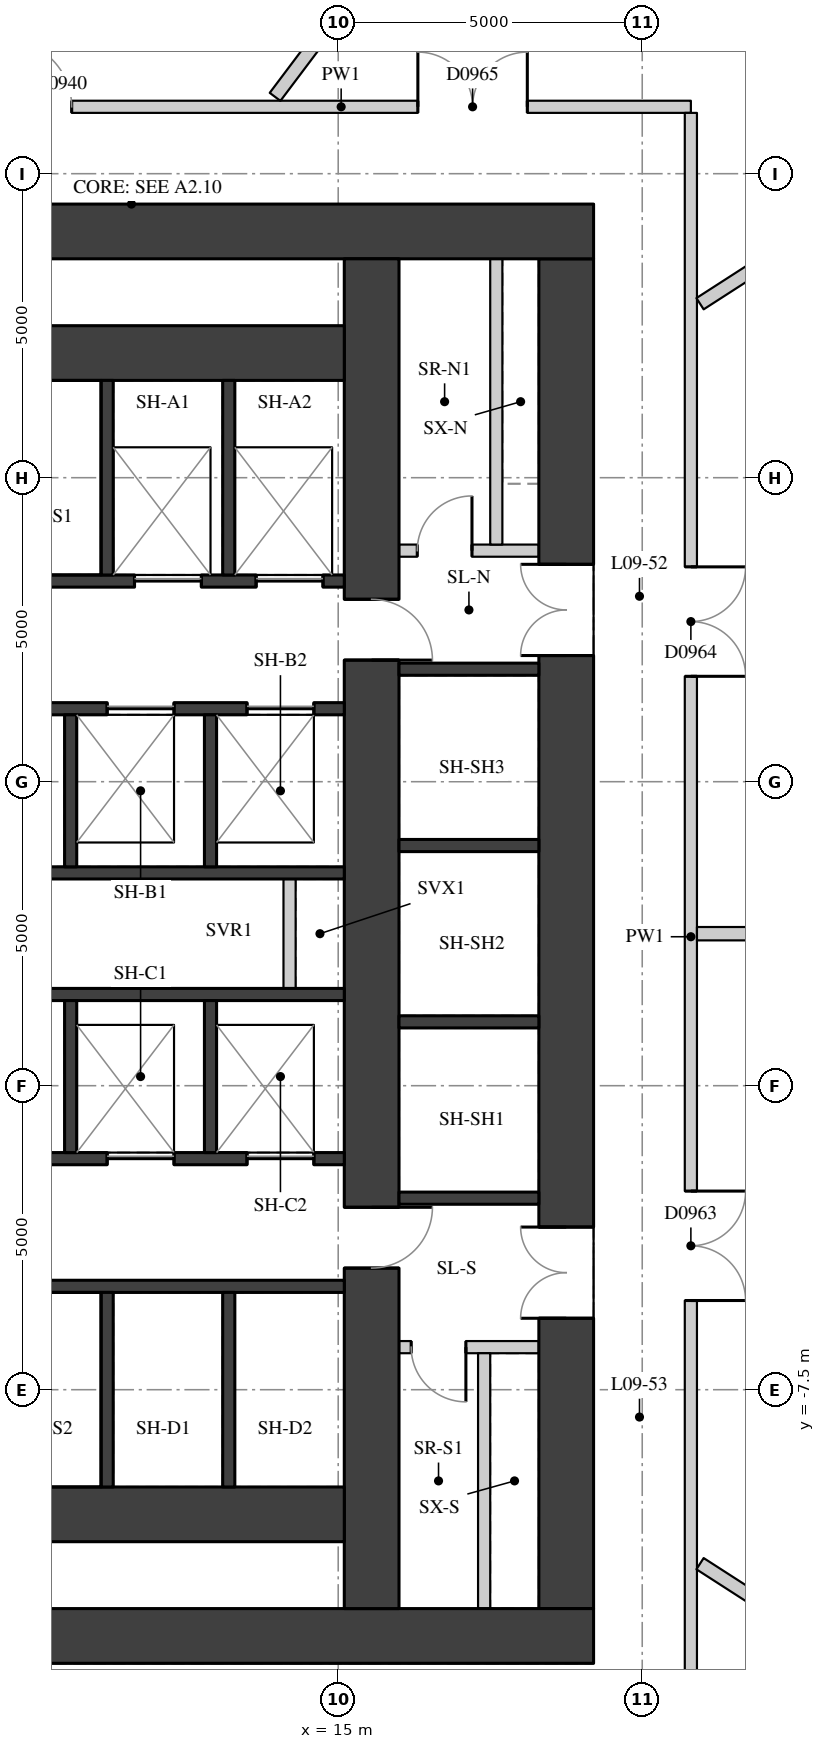
"""IFC4 building model, lengths in metres.
Left out: names, types, materials, properties, quantities, classifications, styles, units other than length and angle.
Written with IfcOpenShell. Run it as: python <this file> out.ifc"""

import sys

from ifc_helpers import new_model, si_unit, direction, frame, frame_2d, origin, place, context, subcontext, project, spatial, rectangle, extrude, element, fill, save


model = new_model("IFC4")
c1 = context("Model", 3, precision=1e-05, world=origin(), true_north=direction((0.0, 1.0)))
c2 = subcontext(c1, "Body", "Model", "MODEL_VIEW")
j1 = project(units=[si_unit("LENGTHUNIT", "METRE"), si_unit("PLANEANGLEUNIT", "RADIAN")], contexts=[c1])
p1 = place(None, origin())
s1 = spatial("IfcSite", under=j1, at=p1, CompositionType="ELEMENT")
p2 = place(p1, origin())
s2 = spatial("IfcBuilding", under=s1, at=p2, CompositionType="ELEMENT")
p3 = place(p2, frame((0.0, 0.0, 38.2)))
s3 = spatial("IfcBuildingStorey", under=s2, at=p3, CompositionType="ELEMENT", Elevation=38.2)
p4 = place(p3, frame((18.75, -11.1, 0.0), z_axis=(0.0, 0.0, 1.0), x_axis=(0.0, 1.0, 0.0)))
e1 = element("IfcWall", 1, at=p4, inside=s3, PredefinedType="SHEAR", context=c2, shape_type="SweptSolid", body=[
    extrude(rectangle(XDim=22.2, YDim=0.9, at=frame_2d((11.1, 0.0))), origin(), (0.0, 0.0, 1.0), 3.02),
])
p5 = place(p4, frame((15.675, 0.0, 0.0)))
e2 = element("IfcOpeningElement", 2, at=p5, cuts=e1, PredefinedType="OPENING", context=c2, shape_type="SweptSolid", body=[
    extrude(rectangle(XDim=1.5, YDim=2.1, at=frame_2d((0.75, 1.05))), frame((0.0, 0.46, 0.0), z_axis=(0.0, -1.0, 0.0), x_axis=(1.0, 0.0, 0.0)), (0.0, 0.0, 1.0), 0.92),
])
p6 = place(p4, frame((4.775, 0.0, 0.0)))
e3 = element("IfcOpeningElement", 3, at=p6, cuts=e1, PredefinedType="OPENING", context=c2, shape_type="SweptSolid", body=[
    extrude(rectangle(XDim=1.5, YDim=2.1, at=frame_2d((0.75, 1.05))), frame((0.0, 0.46, 0.0), z_axis=(0.0, -1.0, 0.0), x_axis=(1.0, 0.0, 0.0)), (0.0, 0.0, 1.0), 0.92),
])
for number, where, z_axis, x_axis in (
    (4, (4.0, 11.55, 0.0), (0.0, 0.0, 1.0), (1.0, 0.0, 0.0)),
    (5, (4.0, -11.55, 0.0), (0.0, 0.0, 1.0), (1.0, 0.0, 0.0)),
):
    element("IfcWall", number, at=place(p3, frame(where, z_axis=z_axis, x_axis=x_axis)), inside=s3, PredefinedType="SHEAR", context=c2, shape_type="SweptSolid", body=[
        extrude(rectangle(XDim=15.2, YDim=0.9, at=frame_2d((7.6, 0.0))), origin(), (0.0, 0.0, 1.0), 3.02),
    ])
p7 = place(p3, frame((15.55, -11.1, 0.0), z_axis=(0.0, 0.0, 1.0), x_axis=(0.0, 1.0, 0.0)))
e6 = element("IfcWall", 6, at=p7, inside=s3, PredefinedType="SHEAR", context=c2, shape_type="SweptSolid", body=[
    extrude(rectangle(XDim=22.2, YDim=0.9, at=frame_2d((11.1, 0.0))), origin(), (0.0, 0.0, 1.0), 3.02),
])
p8 = place(p7, frame((15.6, 0.0, 0.0)))
e7 = element("IfcOpeningElement", 7, at=p8, cuts=e6, PredefinedType="OPENING", context=c2, shape_type="SweptSolid", body=[
    extrude(rectangle(XDim=1.0, YDim=2.1, at=frame_2d((0.5, 1.05))), frame((0.0, 0.46, 0.0), z_axis=(0.0, -1.0, 0.0), x_axis=(1.0, 0.0, 0.0)), (0.0, 0.0, 1.0), 0.92),
])
p9 = place(p7, frame((5.6, 0.0, 0.0)))
e8 = element("IfcOpeningElement", 8, at=p9, cuts=e6, PredefinedType="OPENING", context=c2, shape_type="SweptSolid", body=[
    extrude(rectangle(XDim=1.0, YDim=2.1, at=frame_2d((0.5, 1.05))), frame((0.0, 0.46, 0.0), z_axis=(0.0, -1.0, 0.0), x_axis=(1.0, 0.0, 0.0)), (0.0, 0.0, 1.0), 0.92),
])
for number, where, z_axis, x_axis in (
    (9, (4.9, 9.55, 0.0), (0.0, 0.0, 1.0), (1.0, 0.0, 0.0)),
    (10, (4.9, -9.55, 0.0), (0.0, 0.0, 1.0), (1.0, 0.0, 0.0)),
):
    element("IfcWall", number, at=place(p3, frame(where, z_axis=z_axis, x_axis=x_axis)), inside=s3, PredefinedType="SHEAR", context=c2, shape_type="SweptSolid", body=[
        extrude(rectangle(XDim=10.2, YDim=0.9, at=frame_2d((5.1, 0.0))), origin(), (0.0, 0.0, 1.0), 3.02),
    ])
p10 = place(p3, frame((4.9, 5.8, 0.0), z_axis=(0.0, 0.0, 1.0), x_axis=(1.0, 0.0, 0.0)))
e11 = element("IfcWall", 11, at=p10, inside=s3, PredefinedType="SHEAR", context=c2, shape_type="SweptSolid", body=[
    extrude(rectangle(XDim=10.2, YDim=0.2, at=frame_2d((5.1, 0.0))), origin(), (0.0, 0.0, 1.0), 3.02),
])
p11 = place(p10, frame((6.75, 0.0, 0.0)))
e12 = element("IfcOpeningElement", 12, at=p11, cuts=e11, PredefinedType="OPENING", context=c2, shape_type="SweptSolid", body=[
    extrude(rectangle(XDim=1.1, YDim=2.1, at=frame_2d((0.55, 1.05))), frame((0.0, 0.11, 0.0), z_axis=(0.0, -1.0, 0.0), x_axis=(1.0, 0.0, 0.0)), (0.0, 0.0, 1.0), 0.22),
])
p12 = place(p10, frame((8.75, 0.0, 0.0)))
e13 = element("IfcOpeningElement", 13, at=p12, cuts=e11, PredefinedType="OPENING", context=c2, shape_type="SweptSolid", body=[
    extrude(rectangle(XDim=1.1, YDim=2.1, at=frame_2d((0.55, 1.05))), frame((0.0, 0.11, 0.0), z_axis=(0.0, -1.0, 0.0), x_axis=(1.0, 0.0, 0.0)), (0.0, 0.0, 1.0), 0.22),
])
p13 = place(p3, frame((4.9, 3.7, 0.0), z_axis=(0.0, 0.0, 1.0), x_axis=(1.0, 0.0, 0.0)))
e14 = element("IfcWall", 14, at=p13, inside=s3, PredefinedType="SHEAR", context=c2, shape_type="SweptSolid", body=[
    extrude(rectangle(XDim=10.2, YDim=0.2, at=frame_2d((5.1, 0.0))), origin(), (0.0, 0.0, 1.0), 3.02),
])
p14 = place(p13, frame((6.3, 0.0, 0.0)))
e15 = element("IfcOpeningElement", 15, at=p14, cuts=e14, PredefinedType="OPENING", context=c2, shape_type="SweptSolid", body=[
    extrude(rectangle(XDim=1.1, YDim=2.1, at=frame_2d((0.55, 1.05))), frame((0.0, 0.11, 0.0), z_axis=(0.0, -1.0, 0.0), x_axis=(1.0, 0.0, 0.0)), (0.0, 0.0, 1.0), 0.22),
])
p15 = place(p13, frame((8.6, 0.0, 0.0)))
e16 = element("IfcOpeningElement", 16, at=p15, cuts=e14, PredefinedType="OPENING", context=c2, shape_type="SweptSolid", body=[
    extrude(rectangle(XDim=1.1, YDim=2.1, at=frame_2d((0.55, 1.05))), frame((0.0, 0.11, 0.0), z_axis=(0.0, -1.0, 0.0), x_axis=(1.0, 0.0, 0.0)), (0.0, 0.0, 1.0), 0.22),
])
for number, where, z_axis, x_axis in (
    (17, (4.9, 1.0, 0.0), (0.0, 0.0, 1.0), (1.0, 0.0, 0.0)),
    (18, (4.9, -1.0, 0.0), (0.0, 0.0, 1.0), (1.0, 0.0, 0.0)),
):
    element("IfcWall", number, at=place(p3, frame(where, z_axis=z_axis, x_axis=x_axis)), inside=s3, PredefinedType="SHEAR", context=c2, shape_type="SweptSolid", body=[
        extrude(rectangle(XDim=10.2, YDim=0.2, at=frame_2d((5.1, 0.0))), origin(), (0.0, 0.0, 1.0), 3.02),
    ])
p16 = place(p3, frame((4.9, -3.7, 0.0), z_axis=(0.0, 0.0, 1.0), x_axis=(1.0, 0.0, 0.0)))
e19 = element("IfcWall", 19, at=p16, inside=s3, PredefinedType="SHEAR", context=c2, shape_type="SweptSolid", body=[
    extrude(rectangle(XDim=10.2, YDim=0.2, at=frame_2d((5.1, 0.0))), origin(), (0.0, 0.0, 1.0), 3.02),
])
p17 = place(p16, frame((6.3, 0.0, 0.0)))
e20 = element("IfcOpeningElement", 20, at=p17, cuts=e19, PredefinedType="OPENING", context=c2, shape_type="SweptSolid", body=[
    extrude(rectangle(XDim=1.1, YDim=2.1, at=frame_2d((0.55, 1.05))), frame((0.0, 0.11, 0.0), z_axis=(0.0, -1.0, 0.0), x_axis=(1.0, 0.0, 0.0)), (0.0, 0.0, 1.0), 0.22),
])
p18 = place(p16, frame((8.6, 0.0, 0.0)))
e21 = element("IfcOpeningElement", 21, at=p18, cuts=e19, PredefinedType="OPENING", context=c2, shape_type="SweptSolid", body=[
    extrude(rectangle(XDim=1.1, YDim=2.1, at=frame_2d((0.55, 1.05))), frame((0.0, 0.11, 0.0), z_axis=(0.0, -1.0, 0.0), x_axis=(1.0, 0.0, 0.0)), (0.0, 0.0, 1.0), 0.22),
])
p19 = place(p3, frame((4.9, -5.8, 0.0), z_axis=(0.0, 0.0, 1.0), x_axis=(1.0, 0.0, 0.0)))
e22 = element("IfcWall", 22, at=p19, inside=s3, PredefinedType="SHEAR", context=c2, shape_type="SweptSolid", body=[
    extrude(rectangle(XDim=10.2, YDim=0.2, at=frame_2d((5.1, 0.0))), origin(), (0.0, 0.0, 1.0), 3.02),
])
for number, where, z_axis, x_axis in (
    (23, (11.2, 5.9, 0.0), (0.0, 0.0, 1.0), (0.0, 1.0, 0.0)),
    (24, (11.2, -9.1, 0.0), (0.0, 0.0, 1.0), (0.0, 1.0, 0.0)),
    (25, (13.2, 5.9, 0.0), (0.0, 0.0, 1.0), (0.0, 1.0, 0.0)),
    (26, (13.2, -9.1, 0.0), (0.0, 0.0, 1.0), (0.0, 1.0, 0.0)),
):
    element("IfcWall", number, at=place(p3, frame(where, z_axis=z_axis, x_axis=x_axis)), inside=s3, PredefinedType="SHEAR", context=c2, shape_type="SweptSolid", body=[
        extrude(rectangle(XDim=3.2, YDim=0.2, at=frame_2d((1.6, 0.0))), origin(), (0.0, 0.0, 1.0), 3.02),
    ])
for number, where, z_axis, x_axis in (
    (27, (10.6, 1.1, 0.0), (0.0, 0.0, 1.0), (0.0, 1.0, 0.0)),
    (28, (10.6, -3.6, 0.0), (0.0, 0.0, 1.0), (0.0, 1.0, 0.0)),
    (29, (12.9, 1.1, 0.0), (0.0, 0.0, 1.0), (0.0, 1.0, 0.0)),
    (30, (12.9, -3.6, 0.0), (0.0, 0.0, 1.0), (0.0, 1.0, 0.0)),
):
    element("IfcWall", number, at=place(p3, frame(where, z_axis=z_axis, x_axis=x_axis)), inside=s3, PredefinedType="SHEAR", context=c2, shape_type="SweptSolid", body=[
        extrude(rectangle(XDim=2.5, YDim=0.2, at=frame_2d((1.25, 0.0))), origin(), (0.0, 0.0, 1.0), 3.02),
    ])
p20 = place(p3, frame((14.2, -0.9, 0.0), z_axis=(0.0, 0.0, 1.0), x_axis=(0.0, 1.0, 0.0)))
e31 = element("IfcWall", 31, at=p20, inside=s3, PredefinedType="PARTITIONING", context=c2, shape_type="SweptSolid", body=[
    extrude(rectangle(XDim=1.8, YDim=0.2, at=frame_2d((0.9, 0.0))), origin(), (0.0, 0.0, 1.0), 3.02),
])
for number, where, z_axis, x_axis in (
    (32, (16.0, -4.35, 0.0), (0.0, 0.0, 1.0), (1.0, 0.0, 0.0)),
    (33, (16.0, -1.45, 0.0), (0.0, 0.0, 1.0), (1.0, 0.0, 0.0)),
    (34, (16.0, 1.45, 0.0), (0.0, 0.0, 1.0), (1.0, 0.0, 0.0)),
    (35, (16.0, 4.35, 0.0), (0.0, 0.0, 1.0), (1.0, 0.0, 0.0)),
):
    element("IfcWall", number, at=place(p3, frame(where, z_axis=z_axis, x_axis=x_axis)), inside=s3, PredefinedType="SHEAR", context=c2, shape_type="SweptSolid", body=[
        extrude(rectangle(XDim=2.3, YDim=0.2, at=frame_2d((1.15, 0.0))), origin(), (0.0, 0.0, 1.0), 3.02),
    ])
p21 = place(p3, frame((16.0, 6.3, 0.0), z_axis=(0.0, 0.0, 1.0), x_axis=(1.0, 0.0, 0.0)))
e36 = element("IfcWall", 36, at=p21, inside=s3, PredefinedType="PARTITIONING", context=c2, shape_type="SweptSolid", body=[
    extrude(rectangle(XDim=2.3, YDim=0.2, at=frame_2d((1.15, 0.0))), origin(), (0.0, 0.0, 1.0), 3.02),
])
p22 = place(p21, frame((0.3, 0.0, 0.0)))
e37 = element("IfcOpeningElement", 37, at=p22, cuts=e36, PredefinedType="OPENING", context=c2, shape_type="SweptSolid", body=[
    extrude(rectangle(XDim=0.9, YDim=2.1, at=frame_2d((0.45, 1.05))), frame((0.0, 0.11, 0.0), z_axis=(0.0, -1.0, 0.0), x_axis=(1.0, 0.0, 0.0)), (0.0, 0.0, 1.0), 0.22),
])
p23 = place(p3, frame((17.6, 6.4, 0.0), z_axis=(0.0, 0.0, 1.0), x_axis=(0.0, 1.0, 0.0)))
e38 = element("IfcWall", 38, at=p23, inside=s3, PredefinedType="PARTITIONING", context=c2, shape_type="SweptSolid", body=[
    extrude(rectangle(XDim=4.7, YDim=0.2, at=frame_2d((2.35, 0.0))), origin(), (0.0, 0.0, 1.0), 3.02),
])
p24 = place(p3, frame((16.0, -6.8, 0.0), z_axis=(0.0, 0.0, 1.0), x_axis=(1.0, 0.0, 0.0)))
e39 = element("IfcWall", 39, at=p24, inside=s3, PredefinedType="PARTITIONING", context=c2, shape_type="SweptSolid", body=[
    extrude(rectangle(XDim=2.3, YDim=0.2, at=frame_2d((1.15, 0.0))), origin(), (0.0, 0.0, 1.0), 3.02),
])
p25 = place(p24, frame((0.2, 0.0, 0.0)))
e40 = element("IfcOpeningElement", 40, at=p25, cuts=e39, PredefinedType="OPENING", context=c2, shape_type="SweptSolid", body=[
    extrude(rectangle(XDim=0.9, YDim=2.1, at=frame_2d((0.45, 1.05))), frame((0.0, 0.11, 0.0), z_axis=(0.0, -1.0, 0.0), x_axis=(1.0, 0.0, 0.0)), (0.0, 0.0, 1.0), 0.22),
])
p26 = place(p3, frame((17.4, -11.1, 0.0), z_axis=(0.0, 0.0, 1.0), x_axis=(0.0, 1.0, 0.0)))
e41 = element("IfcWall", 41, at=p26, inside=s3, PredefinedType="PARTITIONING", context=c2, shape_type="SweptSolid", body=[
    extrude(rectangle(XDim=4.2, YDim=0.2, at=frame_2d((2.1, 0.0))), origin(), (0.0, 0.0, 1.0), 3.02),
])
p27 = place(p3, frame((9.297, 13.6, 0.0), z_axis=(0.0, 0.0, 1.0), x_axis=(1.0, 0.0, 0.0)))
e42 = element("IfcWall", 42, at=p27, inside=s3, PredefinedType="PARTITIONING", context=c2, shape_type="SweptSolid", body=[
    extrude(rectangle(XDim=11.503, YDim=0.2, at=frame_2d((5.751, 0.0))), origin(), (0.0, 0.0, 1.0), 3.02),
])
p28 = place(p27, frame((0.22, 0.0, 0.0)))
e43 = element("IfcOpeningElement", 43, at=p28, cuts=e42, PredefinedType="OPENING", context=c2, shape_type="SweptSolid", body=[
    extrude(rectangle(XDim=1.1, YDim=2.1, at=frame_2d((0.55, 1.05))), frame((0.0, 0.11, 0.0), z_axis=(0.0, -1.0, 0.0), x_axis=(1.0, 0.0, 0.0)), (0.0, 0.0, 1.0), 0.22),
])
p29 = place(p27, frame((7.013, 0.0, 0.0)))
e44 = element("IfcOpeningElement", 44, at=p29, cuts=e42, PredefinedType="OPENING", context=c2, shape_type="SweptSolid", body=[
    extrude(rectangle(XDim=1.8, YDim=2.1, at=frame_2d((0.9, 1.05))), frame((0.0, 0.11, 0.0), z_axis=(0.0, -1.0, 0.0), x_axis=(1.0, 0.0, 0.0)), (0.0, 0.0, 1.0), 0.22),
])
p30 = place(p3, frame((20.8, 13.5, 0.0), z_axis=(0.0, 0.0, 1.0), x_axis=(0.0, -1.0, 0.0)))
e45 = element("IfcWall", 45, at=p30, inside=s3, PredefinedType="PARTITIONING", context=c2, shape_type="SweptSolid", body=[
    extrude(rectangle(XDim=27.1, YDim=0.2, at=frame_2d((13.55, 0.0))), origin(), (0.0, 0.0, 1.0), 3.02),
])
p31 = place(p30, frame((17.733, 0.0, 0.0)))
e46 = element("IfcOpeningElement", 46, at=p31, cuts=e45, PredefinedType="OPENING", context=c2, shape_type="SweptSolid", body=[
    extrude(rectangle(XDim=1.8, YDim=2.1, at=frame_2d((0.9, 1.05))), frame((0.0, 0.11, 0.0), z_axis=(0.0, -1.0, 0.0), x_axis=(1.0, 0.0, 0.0)), (0.0, 0.0, 1.0), 0.22),
])
p32 = place(p30, frame((7.467, 0.0, 0.0)))
e47 = element("IfcOpeningElement", 47, at=p32, cuts=e45, PredefinedType="OPENING", context=c2, shape_type="SweptSolid", body=[
    extrude(rectangle(XDim=1.8, YDim=2.1, at=frame_2d((0.9, 1.05))), frame((0.0, 0.11, 0.0), z_axis=(0.0, -1.0, 0.0), x_axis=(1.0, 0.0, 0.0)), (0.0, 0.0, 1.0), 0.22),
])
p33 = place(p3, frame((27.5, 0.0, 0.0), z_axis=(0.0, 0.0, 1.0), x_axis=(-1.0, 0.0, 0.0)))
e48 = element("IfcWall", 48, at=p33, inside=s3, PredefinedType="PARTITIONING", context=c2, shape_type="SweptSolid", body=[
    extrude(rectangle(XDim=6.6, YDim=0.22, at=frame_2d((3.3, 0.0))), origin(), (0.0, 0.0, 1.0), 2.47),
])
p34 = place(p3, frame((23.835, 12.219, 0.0), z_axis=(0.0, 0.0, 1.0), x_axis=(-0.840694872373, -0.541509124176, 0.0)))
e49 = element("IfcWall", 49, at=p34, inside=s3, PredefinedType="PARTITIONING", context=c2, shape_type="SweptSolid", body=[
    extrude(rectangle(XDim=3.43, YDim=0.22, at=frame_2d((1.715, 0.0))), origin(), (0.0, 0.0, 1.0), 3.02),
])
p35 = place(p3, frame((17.708, 18.743, 0.0), z_axis=(0.0, 0.0, 1.0), x_axis=(-0.601177883261, -0.799115231164, 0.0)))
e50 = element("IfcWall", 50, at=p35, inside=s3, PredefinedType="PARTITIONING", context=c2, shape_type="SweptSolid", body=[
    extrude(rectangle(XDim=6.231, YDim=0.22, at=frame_2d((3.116, 0.0))), origin(), (0.0, 0.0, 1.0), 3.02),
])
p36 = place(p3, frame((23.835, -12.219, 0.0), z_axis=(0.0, 0.0, 1.0), x_axis=(-0.840694872373, 0.541509124176, 0.0)))
e51 = element("IfcWall", 51, at=p36, inside=s3, PredefinedType="PARTITIONING", context=c2, shape_type="SweptSolid", body=[
    extrude(rectangle(XDim=3.43, YDim=0.22, at=frame_2d((1.715, 0.0))), origin(), (0.0, 0.0, 1.0), 3.02),
])
p37 = place(p5, origin())
e52 = element("IfcDoor", 52, at=p37, inside=s3, OperationType="DOUBLE_DOOR_SINGLE_SWING", PredefinedType="DOOR", context=c2, shape_type="SweptSolid", body=[
    extrude(rectangle(XDim=1.5, YDim=2.1, at=frame_2d((0.75, 1.05))), frame((0.0, 0.025, 0.0), z_axis=(0.0, -1.0, 0.0), x_axis=(1.0, 0.0, 0.0)), (0.0, 0.0, 1.0), 0.05),
])
fill(e2, e52)
p38 = place(p6, origin())
e53 = element("IfcDoor", 53, at=p38, inside=s3, OperationType="DOUBLE_DOOR_SINGLE_SWING", PredefinedType="DOOR", context=c2, shape_type="SweptSolid", body=[
    extrude(rectangle(XDim=1.5, YDim=2.1, at=frame_2d((0.75, 1.05))), frame((0.0, 0.025, 0.0), z_axis=(0.0, -1.0, 0.0), x_axis=(1.0, 0.0, 0.0)), (0.0, 0.0, 1.0), 0.05),
])
fill(e3, e53)
p39 = place(p11, origin())
e54 = element("IfcDoor", 54, at=p39, inside=s3, OperationType="DOUBLE_DOOR_SLIDING", PredefinedType="DOOR", context=c2, shape_type="SweptSolid", body=[
    extrude(rectangle(XDim=1.1, YDim=2.1, at=frame_2d((0.55, 1.05))), frame((0.0, 0.025, 0.0), z_axis=(0.0, -1.0, 0.0), x_axis=(1.0, 0.0, 0.0)), (0.0, 0.0, 1.0), 0.05),
])
fill(e12, e54)
p40 = place(p12, origin())
e55 = element("IfcDoor", 55, at=p40, inside=s3, OperationType="DOUBLE_DOOR_SLIDING", PredefinedType="DOOR", context=c2, shape_type="SweptSolid", body=[
    extrude(rectangle(XDim=1.1, YDim=2.1, at=frame_2d((0.55, 1.05))), frame((0.0, 0.025, 0.0), z_axis=(0.0, -1.0, 0.0), x_axis=(1.0, 0.0, 0.0)), (0.0, 0.0, 1.0), 0.05),
])
fill(e13, e55)
p41 = place(p14, origin())
e56 = element("IfcDoor", 56, at=p41, inside=s3, OperationType="DOUBLE_DOOR_SLIDING", PredefinedType="DOOR", context=c2, shape_type="SweptSolid", body=[
    extrude(rectangle(XDim=1.1, YDim=2.1, at=frame_2d((0.55, 1.05))), frame((0.0, 0.025, 0.0), z_axis=(0.0, -1.0, 0.0), x_axis=(1.0, 0.0, 0.0)), (0.0, 0.0, 1.0), 0.05),
])
fill(e15, e56)
p42 = place(p15, origin())
e57 = element("IfcDoor", 57, at=p42, inside=s3, OperationType="DOUBLE_DOOR_SLIDING", PredefinedType="DOOR", context=c2, shape_type="SweptSolid", body=[
    extrude(rectangle(XDim=1.1, YDim=2.1, at=frame_2d((0.55, 1.05))), frame((0.0, 0.025, 0.0), z_axis=(0.0, -1.0, 0.0), x_axis=(1.0, 0.0, 0.0)), (0.0, 0.0, 1.0), 0.05),
])
fill(e16, e57)
p43 = place(p17, origin())
e58 = element("IfcDoor", 58, at=p43, inside=s3, OperationType="DOUBLE_DOOR_SLIDING", PredefinedType="DOOR", context=c2, shape_type="SweptSolid", body=[
    extrude(rectangle(XDim=1.1, YDim=2.1, at=frame_2d((0.55, 1.05))), frame((0.0, 0.025, 0.0), z_axis=(0.0, -1.0, 0.0), x_axis=(1.0, 0.0, 0.0)), (0.0, 0.0, 1.0), 0.05),
])
fill(e20, e58)
p44 = place(p18, origin())
e59 = element("IfcDoor", 59, at=p44, inside=s3, OperationType="DOUBLE_DOOR_SLIDING", PredefinedType="DOOR", context=c2, shape_type="SweptSolid", body=[
    extrude(rectangle(XDim=1.1, YDim=2.1, at=frame_2d((0.55, 1.05))), frame((0.0, 0.025, 0.0), z_axis=(0.0, -1.0, 0.0), x_axis=(1.0, 0.0, 0.0)), (0.0, 0.0, 1.0), 0.05),
])
fill(e21, e59)
p45 = place(p8, origin())
e60 = element("IfcDoor", 60, at=p45, inside=s3, OperationType="SINGLE_SWING_RIGHT", PredefinedType="DOOR", context=c2, shape_type="SweptSolid", body=[
    extrude(rectangle(XDim=1.0, YDim=2.1, at=frame_2d((0.5, 1.05))), frame((0.0, 0.025, 0.0), z_axis=(0.0, -1.0, 0.0), x_axis=(1.0, 0.0, 0.0)), (0.0, 0.0, 1.0), 0.05),
])
fill(e7, e60)
p46 = place(p22, origin())
e61 = element("IfcDoor", 61, at=p46, inside=s3, OperationType="SINGLE_SWING_RIGHT", PredefinedType="DOOR", context=c2, shape_type="SweptSolid", body=[
    extrude(rectangle(XDim=0.9, YDim=2.1, at=frame_2d((0.45, 1.05))), frame((0.0, 0.025, 0.0), z_axis=(0.0, -1.0, 0.0), x_axis=(1.0, 0.0, 0.0)), (0.0, 0.0, 1.0), 0.05),
])
fill(e37, e61)
p47 = place(p9, origin())
e62 = element("IfcDoor", 62, at=p47, inside=s3, OperationType="SINGLE_SWING_LEFT", PredefinedType="DOOR", context=c2, shape_type="SweptSolid", body=[
    extrude(rectangle(XDim=1.0, YDim=2.1, at=frame_2d((0.5, 1.05))), frame((0.0, 0.025, 0.0), z_axis=(0.0, -1.0, 0.0), x_axis=(1.0, 0.0, 0.0)), (0.0, 0.0, 1.0), 0.05),
])
fill(e8, e62)
p48 = place(p25, origin())
e63 = element("IfcDoor", 63, at=p48, inside=s3, OperationType="SINGLE_SWING_LEFT", PredefinedType="DOOR", context=c2, shape_type="SweptSolid", body=[
    extrude(rectangle(XDim=0.9, YDim=2.1, at=frame_2d((0.45, 1.05))), frame((0.0, 0.025, 0.0), z_axis=(0.0, -1.0, 0.0), x_axis=(1.0, 0.0, 0.0)), (0.0, 0.0, 1.0), 0.05),
])
fill(e40, e63)
p49 = place(p28, origin())
e64 = element("IfcDoor", 64, at=p49, inside=s3, OperationType="SINGLE_SWING_LEFT", PredefinedType="DOOR", context=c2, shape_type="SweptSolid", body=[
    extrude(rectangle(XDim=1.1, YDim=2.1, at=frame_2d((0.55, 1.05))), frame((0.0, 0.025, 0.0), z_axis=(0.0, -1.0, 0.0), x_axis=(1.0, 0.0, 0.0)), (0.0, 0.0, 1.0), 0.05),
])
fill(e43, e64)
p50 = place(p31, origin())
e65 = element("IfcDoor", 65, at=p50, inside=s3, OperationType="DOUBLE_DOOR_SINGLE_SWING", PredefinedType="DOOR", context=c2, shape_type="SweptSolid", body=[
    extrude(rectangle(XDim=1.8, YDim=2.1, at=frame_2d((0.9, 1.05))), frame((0.0, 0.025, 0.0), z_axis=(0.0, -1.0, 0.0), x_axis=(1.0, 0.0, 0.0)), (0.0, 0.0, 1.0), 0.05),
])
fill(e46, e65)
p51 = place(p32, origin())
e66 = element("IfcDoor", 66, at=p51, inside=s3, OperationType="DOUBLE_DOOR_SINGLE_SWING", PredefinedType="DOOR", context=c2, shape_type="SweptSolid", body=[
    extrude(rectangle(XDim=1.8, YDim=2.1, at=frame_2d((0.9, 1.05))), frame((0.0, 0.025, 0.0), z_axis=(0.0, -1.0, 0.0), x_axis=(1.0, 0.0, 0.0)), (0.0, 0.0, 1.0), 0.05),
])
fill(e47, e66)
p52 = place(p29, origin())
e67 = element("IfcDoor", 67, at=p52, inside=s3, OperationType="DOUBLE_DOOR_SINGLE_SWING", PredefinedType="DOOR", context=c2, shape_type="SweptSolid", body=[
    extrude(rectangle(XDim=1.8, YDim=2.1, at=frame_2d((0.9, 1.05))), frame((0.0, 0.025, 0.0), z_axis=(0.0, -1.0, 0.0), x_axis=(1.0, 0.0, 0.0)), (0.0, 0.0, 1.0), 0.05),
])
fill(e44, e67)
save(model, sys.argv[1])
